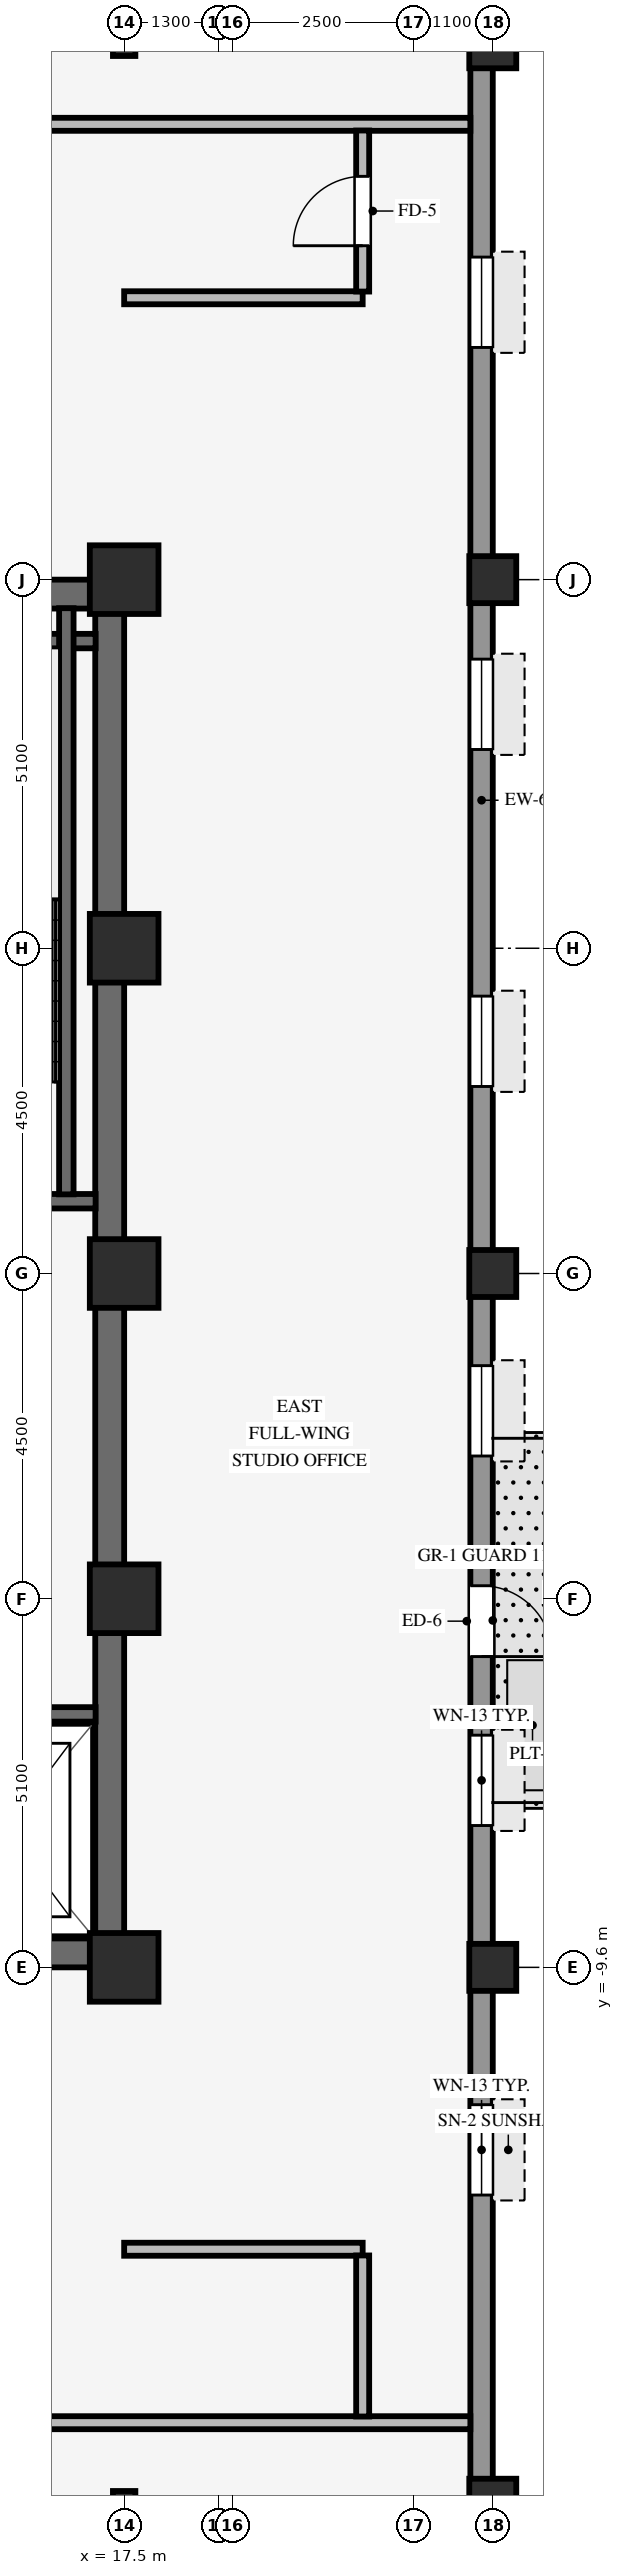
"""IFC4 building model, lengths in metres.
Left out: names, types, materials, properties, quantities, classifications, styles, units other than length and angle.
Written with IfcOpenShell. Run it as: python <this file> out.ifc"""

import sys

from ifc_helpers import new_model, si_unit, direction, frame, frame_2d, origin, origin_2d, place, context, subcontext, project, spatial, rectangle, hollow_rectangle, i_section, extrude, source, transform, mapped, element, fill, save


model = new_model("IFC4")
c1 = context("Model", 3, precision=1e-05, world=origin(), true_north=direction((0.0, 1.0)))
c2 = subcontext(c1, "Body", "Model", "MODEL_VIEW")
j1 = project(units=[si_unit("LENGTHUNIT", "METRE"), si_unit("PLANEANGLEUNIT", "RADIAN")], contexts=[c1])
p1 = place(None, origin())
s1 = spatial("IfcSite", under=j1, at=p1, CompositionType="ELEMENT")
p2 = place(p1, origin())
s2 = spatial("IfcBuilding", under=s1, at=p2, CompositionType="ELEMENT")
p3 = place(p2, frame((0.0, 0.0, 174.95)))
s3 = spatial("IfcBuildingStorey", under=s2, at=p3, CompositionType="ELEMENT", Elevation=174.95)
for number, where, z_axis, x_axis in (
    (1, (9.0, -9.4, 0.0), (0.0, 0.0, 1.0), (1.0, 0.0, 0.0)),
    (2, (9.0, 9.4, 0.0), (0.0, 0.0, 1.0), (1.0, 0.0, 0.0)),
):
    element("IfcWall", number, at=place(p3, frame(where, z_axis=z_axis, x_axis=x_axis)), inside=s3, PredefinedType="SHEAR", context=c2, shape_type="SweptSolid", body=[
        extrude(rectangle(XDim=8.5, YDim=0.4, at=frame_2d((4.25, 0.0))), origin(), (0.0, 0.0, 1.0), 3.37),
    ])
p4 = place(p3, frame((17.3, -9.205, 0.0), z_axis=(0.0, 0.0, 1.0), x_axis=(0.0, 1.0, 0.0)))
e3 = element("IfcWall", 3, at=p4, inside=s3, PredefinedType="SHEAR", context=c2, shape_type="SweptSolid", body=[
    extrude(rectangle(XDim=18.41, YDim=0.4, at=frame_2d((9.205, 0.0))), origin(), (0.0, 0.0, 1.0), 3.37),
])
for number, where, z_axis, x_axis in (
    (4, (17.5, -9.6, 0.0), (0.0, 0.0, 1.0), (1.0, 0.0, 0.0)),
    (5, (17.5, -4.5, 0.0), (0.0, 0.0, 1.0), (1.0, 0.0, 0.0)),
    (6, (17.5, 4.5, 0.0), (0.0, 0.0, 1.0), (1.0, 0.0, 0.0)),
    (7, (17.5, 9.6, 0.0), (0.0, 0.0, 1.0), (1.0, 0.0, 0.0)),
    (8, (17.5, 0.0, 0.0), (0.0, 0.0, 1.0), (1.0, 0.0, 0.0)),
):
    element("IfcColumn", number, at=place(p3, frame(where, z_axis=z_axis, x_axis=x_axis)), inside=s3, PredefinedType="COLUMN", context=c2, shape_type="SweptSolid", body=[
        extrude(rectangle(XDim=0.95, YDim=0.95, at=origin_2d()), origin(), (0.0, 0.0, 1.0), 3.37),
    ])
for number, where, z_axis, x_axis in (
    (9, (22.6, -17.0, 0.0), (0.0, 0.0, 1.0), (1.0, 0.0, 0.0)),
    (10, (22.6, -9.6, 0.0), (0.0, 0.0, 1.0), (1.0, 0.0, 0.0)),
    (11, (22.6, 0.0, 0.0), (0.0, 0.0, 1.0), (1.0, 0.0, 0.0)),
    (12, (22.6, 9.6, 0.0), (0.0, 0.0, 1.0), (1.0, 0.0, 0.0)),
    (13, (22.6, 17.0, 0.0), (0.0, 0.0, 1.0), (1.0, 0.0, 0.0)),
):
    element("IfcColumn", number, at=place(p3, frame(where, z_axis=z_axis, x_axis=x_axis)), inside=s3, PredefinedType="COLUMN", context=c2, shape_type="SweptSolid", body=[
        extrude(hollow_rectangle(XDim=0.65, YDim=0.65, WallThickness=0.04, InnerFilletRadius=0.04, OuterFilletRadius=0.08, at=origin_2d()), origin(), (0.0, 0.0, 1.0), 3.37),
    ])
for number, where, z_axis, x_axis in (
    (14, (17.5, -17.0, 0.0), (0.0, 0.0, 1.0), (1.0, 0.0, 0.0)),
    (15, (17.5, 17.0, 0.0), (0.0, 0.0, 1.0), (1.0, 0.0, 0.0)),
):
    element("IfcColumn", number, at=place(p3, frame(where, z_axis=z_axis, x_axis=x_axis)), inside=s3, PredefinedType="COLUMN", context=c2, shape_type="SweptSolid", body=[
        extrude(i_section(OverallWidth=0.31, OverallDepth=0.31, WebThickness=0.015, FlangeThickness=0.015, FilletRadius=0.015, at=origin_2d()), origin(), (0.0, 0.0, 1.0), 3.37),
    ])
p5 = place(p3, frame((22.445, -20.794, 0.0), z_axis=(0.0, 0.0, 1.0), x_axis=(0.0, 1.0, 0.0)))
e16 = element("IfcWall", 16, at=p5, inside=s3, PredefinedType="STANDARD", context=c2, shape_type="SweptSolid", body=[
    extrude(rectangle(XDim=37.788, YDim=0.31, at=frame_2d((18.894, 0.0))), origin(), (0.0, 0.0, 1.0), 2.705),
])
p6 = place(p5, frame((16.474, 0.0, 0.0), z_axis=(0.0, 0.0, 1.0), x_axis=(-1.0, 0.0, 0.0)))
e17 = element("IfcOpeningElement", 17, at=p6, cuts=e16, PredefinedType="OPENING", context=c2, shape_type="SweptSolid", body=[
    extrude(rectangle(XDim=0.98, YDim=2.15, at=frame_2d((0.49, 1.075))), frame((0.0, 0.165, 0.0), z_axis=(0.0, -1.0, 0.0), x_axis=(1.0, 0.0, 0.0)), (0.0, 0.0, 1.0), 0.33),
])
p7 = place(p5, frame((1.581, 0.0, 0.8)))
e18 = element("IfcOpeningElement", 18, at=p7, cuts=e16, PredefinedType="OPENING", context=c2, shape_type="SweptSolid", body=[
    extrude(rectangle(XDim=1.25, YDim=1.52, at=frame_2d((0.625, 0.76))), frame((0.0, 0.165, 0.0), z_axis=(0.0, -1.0, 0.0), x_axis=(1.0, 0.0, 0.0)), (0.0, 0.0, 1.0), 0.33),
])
p8 = place(p5, frame((8.044, 0.0, 0.8)))
e19 = element("IfcOpeningElement", 19, at=p8, cuts=e16, PredefinedType="OPENING", context=c2, shape_type="SweptSolid", body=[
    extrude(rectangle(XDim=1.25, YDim=1.52, at=frame_2d((0.625, 0.76))), frame((0.0, 0.165, 0.0), z_axis=(0.0, -1.0, 0.0), x_axis=(1.0, 0.0, 0.0)), (0.0, 0.0, 1.0), 0.33),
])
p9 = place(p5, frame((13.156, 0.0, 0.8)))
e20 = element("IfcOpeningElement", 20, at=p9, cuts=e16, PredefinedType="OPENING", context=c2, shape_type="SweptSolid", body=[
    extrude(rectangle(XDim=1.25, YDim=1.52, at=frame_2d((0.625, 0.76))), frame((0.0, 0.165, 0.0), z_axis=(0.0, -1.0, 0.0), x_axis=(1.0, 0.0, 0.0)), (0.0, 0.0, 1.0), 0.33),
])
p10 = place(p5, frame((18.269, 0.0, 0.8)))
e21 = element("IfcOpeningElement", 21, at=p10, cuts=e16, PredefinedType="OPENING", context=c2, shape_type="SweptSolid", body=[
    extrude(rectangle(XDim=1.25, YDim=1.52, at=frame_2d((0.625, 0.76))), frame((0.0, 0.165, 0.0), z_axis=(0.0, -1.0, 0.0), x_axis=(1.0, 0.0, 0.0)), (0.0, 0.0, 1.0), 0.33),
])
p11 = place(p5, frame((23.382, 0.0, 0.8)))
e22 = element("IfcOpeningElement", 22, at=p11, cuts=e16, PredefinedType="OPENING", context=c2, shape_type="SweptSolid", body=[
    extrude(rectangle(XDim=1.25, YDim=1.52, at=frame_2d((0.625, 0.76))), frame((0.0, 0.165, 0.0), z_axis=(0.0, -1.0, 0.0), x_axis=(1.0, 0.0, 0.0)), (0.0, 0.0, 1.0), 0.33),
])
p12 = place(p5, frame((28.044, 0.0, 0.8)))
e23 = element("IfcOpeningElement", 23, at=p12, cuts=e16, PredefinedType="OPENING", context=c2, shape_type="SweptSolid", body=[
    extrude(rectangle(XDim=1.25, YDim=1.52, at=frame_2d((0.625, 0.76))), frame((0.0, 0.165, 0.0), z_axis=(0.0, -1.0, 0.0), x_axis=(1.0, 0.0, 0.0)), (0.0, 0.0, 1.0), 0.33),
])
p13 = place(p5, frame((33.607, 0.0, 0.8)))
e24 = element("IfcOpeningElement", 24, at=p13, cuts=e16, PredefinedType="OPENING", context=c2, shape_type="SweptSolid", body=[
    extrude(rectangle(XDim=1.25, YDim=1.52, at=frame_2d((0.625, 0.76))), frame((0.0, 0.165, 0.0), z_axis=(0.0, -1.0, 0.0), x_axis=(1.0, 0.0, 0.0)), (0.0, 0.0, 1.0), 0.33),
])
for number, where, z_axis, x_axis in (
    (25, (13.535, 1.0, 0.0), (0.0, 0.0, 1.0), (1.0, 0.0, 0.0)),
    (26, (13.535, 8.75, 0.0), (0.0, 0.0, 1.0), (1.0, 0.0, 0.0)),
):
    element("IfcWall", number, at=place(p3, frame(where, z_axis=z_axis, x_axis=x_axis)), inside=s3, PredefinedType="SHEAR", context=c2, shape_type="SweptSolid", body=[
        extrude(rectangle(XDim=3.57, YDim=0.2, at=frame_2d((1.785, 0.0))), origin(), (0.0, 0.0, 1.0), 3.37),
    ])
p14 = place(p3, frame((16.7, 1.095, 0.0), z_axis=(0.0, 0.0, 1.0), x_axis=(0.0, 1.0, 0.0)))
e27 = element("IfcWall", 27, at=p14, inside=s3, PredefinedType="SHEAR", context=c2, shape_type="SweptSolid", body=[
    extrude(rectangle(XDim=8.11, YDim=0.2, at=frame_2d((4.055, 0.0))), origin(), (0.0, 0.0, 1.0), 3.37),
])
p15 = place(p3, frame((14.645, -6.1, 0.0), z_axis=(0.0, 0.0, 1.0), x_axis=(1.0, 0.0, 0.0)))
e28 = element("IfcWall", 28, at=p15, inside=s3, PredefinedType="SHEAR", context=c2, shape_type="SweptSolid", body=[
    extrude(rectangle(XDim=2.46, YDim=0.2, at=frame_2d((1.23, 0.0))), origin(), (0.0, 0.0, 1.0), 3.37),
])
p16 = place(p3, frame((-26.09, -15.9, 0.0), z_axis=(0.0, 0.0, 1.0), x_axis=(1.0, 0.0, 0.0)))
e29 = element("IfcWall", 29, at=p16, inside=s3, PredefinedType="PARTITIONING", context=c2, shape_type="SweptSolid", body=[
    extrude(rectangle(XDim=48.38, YDim=0.18, at=frame_2d((24.19, 0.0))), origin(), (0.0, 0.0, 1.0), 3.36),
])
p17 = place(p16, frame((26.51, 0.0, 0.0)))
e30 = element("IfcOpeningElement", 30, at=p17, cuts=e29, PredefinedType="OPENING", context=c2, shape_type="SweptSolid", body=[
    extrude(rectangle(XDim=0.96, YDim=2.1, at=frame_2d((0.48, 1.05))), frame((0.0, 0.1, 0.0), z_axis=(0.0, -1.0, 0.0), x_axis=(1.0, 0.0, 0.0)), (0.0, 0.0, 1.0), 0.2),
])
p18 = place(p16, frame((40.51, 0.0, 0.0)))
e31 = element("IfcOpeningElement", 31, at=p18, cuts=e29, PredefinedType="OPENING", context=c2, shape_type="SweptSolid", body=[
    extrude(rectangle(XDim=0.96, YDim=2.1, at=frame_2d((0.48, 1.05))), frame((0.0, 0.1, 0.0), z_axis=(0.0, -1.0, 0.0), x_axis=(1.0, 0.0, 0.0)), (0.0, 0.0, 1.0), 0.2),
])
p19 = place(p16, frame((13.62, 0.0, 0.0)))
e32 = element("IfcOpeningElement", 32, at=p19, cuts=e29, PredefinedType="OPENING", context=c2, shape_type="SweptSolid", body=[
    extrude(rectangle(XDim=0.96, YDim=2.1, at=frame_2d((0.48, 1.05))), frame((0.0, 0.1, 0.0), z_axis=(0.0, -1.0, 0.0), x_axis=(1.0, 0.0, 0.0)), (0.0, 0.0, 1.0), 0.2),
])
for number, where, z_axis, x_axis in (
    (33, (17.5, -13.5, 0.0), (0.0, 0.0, 1.0), (1.0, 0.0, 0.0)),
    (34, (17.5, 13.5, 0.0), (0.0, 0.0, 1.0), (1.0, 0.0, 0.0)),
):
    element("IfcWall", number, at=place(p3, frame(where, z_axis=z_axis, x_axis=x_axis)), inside=s3, PredefinedType="PARTITIONING", context=c2, shape_type="SweptSolid", body=[
        extrude(rectangle(XDim=3.3, YDim=0.18, at=frame_2d((1.65, 0.0))), origin(), (0.0, 0.0, 1.0), 3.008),
    ])
p20 = place(p3, frame((-26.09, 15.9, 0.0), z_axis=(0.0, 0.0, 1.0), x_axis=(1.0, 0.0, 0.0)))
e35 = element("IfcWall", 35, at=p20, inside=s3, PredefinedType="PARTITIONING", context=c2, shape_type="SweptSolid", body=[
    extrude(rectangle(XDim=48.38, YDim=0.18, at=frame_2d((24.19, 0.0))), origin(), (0.0, 0.0, 1.0), 3.36),
])
p21 = place(p20, frame((40.51, 0.0, 0.0)))
e36 = element("IfcOpeningElement", 36, at=p21, cuts=e35, PredefinedType="OPENING", context=c2, shape_type="SweptSolid", body=[
    extrude(rectangle(XDim=0.96, YDim=2.1, at=frame_2d((0.48, 1.05))), frame((0.0, 0.1, 0.0), z_axis=(0.0, -1.0, 0.0), x_axis=(1.0, 0.0, 0.0)), (0.0, 0.0, 1.0), 0.2),
])
p22 = place(p20, frame((19.995, 0.0, 0.0)))
e37 = element("IfcOpeningElement", 37, at=p22, cuts=e35, PredefinedType="OPENING", context=c2, shape_type="SweptSolid", body=[
    extrude(rectangle(XDim=0.96, YDim=2.1, at=frame_2d((0.48, 1.05))), frame((0.0, 0.1, 0.0), z_axis=(0.0, -1.0, 0.0), x_axis=(1.0, 0.0, 0.0)), (0.0, 0.0, 1.0), 0.2),
])
p23 = place(p20, frame((28.45, 0.0, 0.0)))
e38 = element("IfcOpeningElement", 38, at=p23, cuts=e35, PredefinedType="OPENING", context=c2, shape_type="SweptSolid", body=[
    extrude(rectangle(XDim=0.96, YDim=2.1, at=frame_2d((0.48, 1.05))), frame((0.0, 0.1, 0.0), z_axis=(0.0, -1.0, 0.0), x_axis=(1.0, 0.0, 0.0)), (0.0, 0.0, 1.0), 0.2),
])
p24 = place(p20, frame((11.605, 0.0, 0.0)))
e39 = element("IfcOpeningElement", 39, at=p24, cuts=e35, PredefinedType="OPENING", context=c2, shape_type="SweptSolid", body=[
    extrude(rectangle(XDim=0.96, YDim=2.1, at=frame_2d((0.48, 1.05))), frame((0.0, 0.1, 0.0), z_axis=(0.0, -1.0, 0.0), x_axis=(1.0, 0.0, 0.0)), (0.0, 0.0, 1.0), 0.2),
])
p25 = place(p20, frame((2.465, 0.0, 0.0)))
e40 = element("IfcOpeningElement", 40, at=p25, cuts=e35, PredefinedType="OPENING", context=c2, shape_type="SweptSolid", body=[
    extrude(rectangle(XDim=0.96, YDim=2.1, at=frame_2d((0.48, 1.05))), frame((0.0, 0.1, 0.0), z_axis=(0.0, -1.0, 0.0), x_axis=(1.0, 0.0, 0.0)), (0.0, 0.0, 1.0), 0.2),
])
p26 = place(p3, frame((20.8, -15.814, 0.0), z_axis=(0.0, 0.0, 1.0), x_axis=(0.0, 1.0, 0.0)))
e41 = element("IfcWall", 41, at=p26, inside=s3, PredefinedType="PARTITIONING", context=c2, shape_type="SweptSolid", body=[
    extrude(rectangle(XDim=2.228, YDim=0.18, at=frame_2d((1.114, 0.0))), origin(), (0.0, 0.0, 1.0), 3.36),
])
p27 = place(p3, frame((20.8, 13.586, 0.0), z_axis=(0.0, 0.0, 1.0), x_axis=(0.0, 1.0, 0.0)))
e42 = element("IfcWall", 42, at=p27, inside=s3, PredefinedType="PARTITIONING", context=c2, shape_type="SweptSolid", body=[
    extrude(rectangle(XDim=2.228, YDim=0.18, at=frame_2d((1.114, 0.0))), origin(), (0.0, 0.0, 1.0), 3.36),
])
p28 = place(p27, frame((0.634, 0.0, 0.0)))
e43 = element("IfcOpeningElement", 43, at=p28, cuts=e42, PredefinedType="OPENING", context=c2, shape_type="SweptSolid", body=[
    extrude(rectangle(XDim=0.96, YDim=2.1, at=frame_2d((0.48, 1.05))), frame((0.0, 0.1, 0.0), z_axis=(0.0, -1.0, 0.0), x_axis=(1.0, 0.0, 0.0)), (0.0, 0.0, 1.0), 0.2),
])
m1 = source(origin(), c2, "Body", "SweptSolid", [
    extrude(rectangle(XDim=0.98, YDim=2.15, at=frame_2d((0.49, 1.075))), frame((0.0, 0.025, 0.0), z_axis=(0.0, -1.0, 0.0), x_axis=(1.0, 0.0, 0.0)), (0.0, 0.0, 1.0), 0.05),
])
p29 = place(p6, origin())
e44 = element("IfcDoor", 44, at=p29, inside=s3, OperationType="SINGLE_SWING_RIGHT", PredefinedType="DOOR", context=c2, shape_type="MappedRepresentation", body=[
    mapped(m1, transform((0.0, 0.0, 0.0), scale=1.0)),
])
fill(e17, e44)
m2 = source(origin(), c2, "Body", "SweptSolid", [
    extrude(rectangle(XDim=1.25, YDim=1.52, at=frame_2d((0.625, 0.76))), frame((0.0, 0.03, 0.0), z_axis=(0.0, -1.0, 0.0), x_axis=(1.0, 0.0, 0.0)), (0.0, 0.0, 1.0), 0.06),
])
p30 = place(p8, origin())
e45 = element("IfcWindow", 45, at=p30, inside=s3, PartitioningType="SINGLE_PANEL", PredefinedType="WINDOW", context=c2, shape_type="MappedRepresentation", body=[
    mapped(m2, transform((0.0, 0.0, 0.0), scale=1.0)),
])
fill(e19, e45)
p31 = place(p9, origin())
e46 = element("IfcWindow", 46, at=p31, inside=s3, PartitioningType="SINGLE_PANEL", PredefinedType="WINDOW", context=c2, shape_type="MappedRepresentation", body=[
    mapped(m2, transform((0.0, 0.0, 0.0), scale=1.0)),
])
fill(e20, e46)
p32 = place(p10, origin())
e47 = element("IfcWindow", 47, at=p32, inside=s3, PartitioningType="SINGLE_PANEL", PredefinedType="WINDOW", context=c2, shape_type="MappedRepresentation", body=[
    mapped(m2, transform((0.0, 0.0, 0.0), scale=1.0)),
])
fill(e21, e47)
p33 = place(p11, origin())
e48 = element("IfcWindow", 48, at=p33, inside=s3, PartitioningType="SINGLE_PANEL", PredefinedType="WINDOW", context=c2, shape_type="MappedRepresentation", body=[
    mapped(m2, transform((0.0, 0.0, 0.0), scale=1.0)),
])
fill(e22, e48)
p34 = place(p12, origin())
e49 = element("IfcWindow", 49, at=p34, inside=s3, PartitioningType="SINGLE_PANEL", PredefinedType="WINDOW", context=c2, shape_type="MappedRepresentation", body=[
    mapped(m2, transform((0.0, 0.0, 0.0), scale=1.0)),
])
fill(e23, e49)
p35 = place(p13, origin())
e50 = element("IfcWindow", 50, at=p35, inside=s3, PartitioningType="SINGLE_PANEL", PredefinedType="WINDOW", context=c2, shape_type="MappedRepresentation", body=[
    mapped(m2, transform((0.0, 0.0, 0.0), scale=1.0)),
])
fill(e24, e50)
m3 = source(origin(), c2, "Body", "SweptSolid", [
    extrude(rectangle(XDim=0.96, YDim=2.1, at=frame_2d((0.48, 1.05))), frame((0.0, 0.025, 0.0), z_axis=(0.0, -1.0, 0.0), x_axis=(1.0, 0.0, 0.0)), (0.0, 0.0, 1.0), 0.05),
])
p36 = place(p28, origin())
e51 = element("IfcDoor", 51, at=p36, inside=s3, OperationType="SINGLE_SWING_LEFT", PredefinedType="DOOR", context=c2, shape_type="MappedRepresentation", body=[
    mapped(m3, transform((0.0, 0.0, 0.0), scale=1.0)),
])
fill(e43, e51)
save(model, sys.argv[1])
